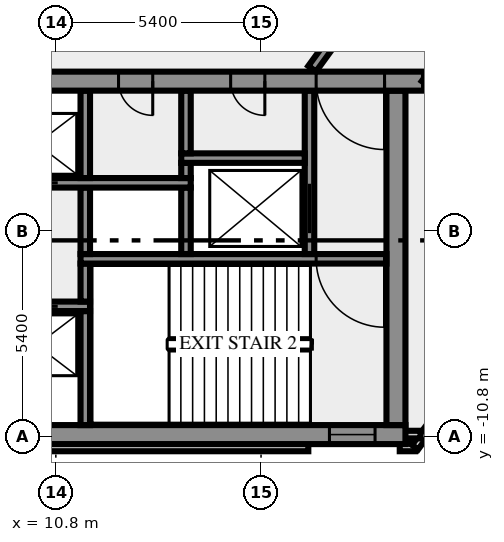
"""IFC4 building model, lengths in metres.
Left out: names, types, materials, properties, quantities, classifications, styles, units other than length and angle.
Written with IfcOpenShell. Run it as: python <this file> out.ifc"""

import sys

from ifc_helpers import new_model, si_unit, direction, frame, frame_2d, origin, place, context, subcontext, project, spatial, rectangle, extrude, element, fill, save


model = new_model("IFC4")
c1 = context("Model", 3, precision=1e-05, world=origin(), true_north=direction((0.0, 1.0)))
c2 = subcontext(c1, "Body", "Model", "MODEL_VIEW")
j1 = project(units=[si_unit("LENGTHUNIT", "METRE"), si_unit("PLANEANGLEUNIT", "RADIAN")], contexts=[c1])
p1 = place(None, origin())
s1 = spatial("IfcSite", under=j1, at=p1, CompositionType="ELEMENT")
p2 = place(p1, origin())
s2 = spatial("IfcBuilding", under=s1, at=p2, CompositionType="ELEMENT")
p3 = place(p2, frame((0.0, 0.0, 238.0)))
s3 = spatial("IfcBuildingStorey", under=s2, at=p3, CompositionType="ELEMENT", Elevation=238.0)
p4 = place(p3, frame((-17.444, -11.088, 0.0), z_axis=(0.0, 0.0, 1.0), x_axis=(1.0, 0.0, 0.0)))
e1 = element("IfcWall", 1, at=p4, inside=s3, PredefinedType="SOLIDWALL", context=c2, shape_type="SweptSolid", body=[
    extrude(rectangle(XDim=34.888, YDim=0.2, at=frame_2d((17.444, 0.0))), origin(), (0.0, 0.0, 1.0), 3.4),
])
p5 = place(p3, frame((19.85, -11.088, 0.0), z_axis=(0.0, 0.0, 1.0), x_axis=(1.0, 0.0, 0.0)))
e2 = element("IfcWall", 2, at=p5, inside=s3, PredefinedType="SOLIDWALL", context=c2, shape_type="SweptSolid", body=[
    extrude(rectangle(XDim=0.406, YDim=0.2, at=frame_2d((0.203, 0.0))), origin(), (0.0, 0.0, 1.0), 3.4),
])
p6 = place(p3, frame((20.253, -11.083, 0.0), z_axis=(0.0, 0.0, 1.0), x_axis=(0.587766567315, 0.809030569476, 0.0)))
e3 = element("IfcWall", 3, at=p6, inside=s3, PredefinedType="SOLIDWALL", context=c2, shape_type="SweptSolid", body=[
    extrude(rectangle(XDim=2.688, YDim=0.2, at=frame_2d((1.344, 0.0))), origin(), (0.0, 0.0, 1.0), 3.4),
])
p7 = place(p3, frame((19.98, -10.75, 0.0), z_axis=(0.0, 0.0, 1.0), x_axis=(1.0, 0.0, 0.0)))
e4 = element("IfcWall", 4, at=p7, inside=s3, PredefinedType="SOLIDWALL", context=c2, shape_type="SweptSolid", body=[
    extrude(rectangle(XDim=0.417, YDim=0.2, at=frame_2d((0.208, 0.0))), origin(), (0.0, 0.0, 1.0), 3.4),
])
p8 = place(p3, frame((-20.0, -10.75, 0.0), z_axis=(0.0, 0.0, 1.0), x_axis=(1.0, 0.0, 0.0)))
e5 = element("IfcWall", 5, at=p8, inside=s3, PredefinedType="SHEAR", context=c2, shape_type="SweptSolid", body=[
    extrude(rectangle(XDim=40.0, YDim=0.5, at=frame_2d((20.0, 0.0))), origin(), (0.0, 0.0, 1.0), 3.4),
])
p9 = place(p8, frame((0.8, 0.0, 1.0)))
e6 = element("IfcOpeningElement", 6, at=p9, cuts=e5, PredefinedType="OPENING", context=c2, shape_type="SweptSolid", body=[
    extrude(rectangle(XDim=1.2, YDim=1.2, at=frame_2d((0.6, 0.6))), frame((0.0, 0.26, 0.0), z_axis=(0.0, -1.0, 0.0), x_axis=(1.0, 0.0, 0.0)), (0.0, 0.0, 1.0), 0.52),
])
p10 = place(p8, frame((38.0, 0.0, 1.0)))
e7 = element("IfcOpeningElement", 7, at=p10, cuts=e5, PredefinedType="OPENING", context=c2, shape_type="SweptSolid", body=[
    extrude(rectangle(XDim=1.2, YDim=1.2, at=frame_2d((0.6, 0.6))), frame((0.0, 0.26, 0.0), z_axis=(0.0, -1.0, 0.0), x_axis=(1.0, 0.0, 0.0)), (0.0, 0.0, 1.0), 0.52),
])
p11 = place(p3, frame((11.575, -10.5, 0.0), z_axis=(0.0, 0.0, 1.0), x_axis=(0.0, 1.0, 0.0)))
e8 = element("IfcWall", 8, at=p11, inside=s3, PredefinedType="SHEAR", context=c2, shape_type="SweptSolid", body=[
    extrude(rectangle(XDim=3.0, YDim=0.25, at=frame_2d((1.5, 0.0))), origin(), (0.0, 0.0, 1.0), 3.4),
])
p12 = place(p3, frame((19.75, -10.5, 0.0), z_axis=(0.0, 0.0, 1.0), x_axis=(0.0, 1.0, 0.0)))
e9 = element("IfcWall", 9, at=p12, inside=s3, PredefinedType="SHEAR", context=c2, shape_type="SweptSolid", body=[
    extrude(rectangle(XDim=8.8, YDim=0.5, at=frame_2d((4.4, 0.0))), origin(), (0.0, 0.0, 1.0), 3.4),
])
p13 = place(p3, frame((11.7, -7.375, 0.0), z_axis=(0.0, 0.0, 1.0), x_axis=(-1.0, 0.0, 0.0)))
e10 = element("IfcWall", 10, at=p13, inside=s3, PredefinedType="SHEAR", context=c2, shape_type="SweptSolid", body=[
    extrude(rectangle(XDim=23.4, YDim=0.25, at=frame_2d((11.7, 0.0))), origin(), (0.0, 0.0, 1.0), 3.4),
])
p14 = place(p13, frame((19.05, 0.0, 0.0)))
e11 = element("IfcOpeningElement", 11, at=p14, cuts=e10, PredefinedType="OPENING", context=c2, shape_type="SweptSolid", body=[
    extrude(rectangle(XDim=0.9, YDim=2.1, at=frame_2d((0.45, 1.05))), frame((0.0, 0.135, 0.0), z_axis=(0.0, -1.0, 0.0), x_axis=(1.0, 0.0, 0.0)), (0.0, 0.0, 1.0), 0.27),
])
p15 = place(p13, frame((14.55, 0.0, 0.0)))
e12 = element("IfcOpeningElement", 12, at=p15, cuts=e10, PredefinedType="OPENING", context=c2, shape_type="SweptSolid", body=[
    extrude(rectangle(XDim=0.8, YDim=2.1, at=frame_2d((0.4, 1.05))), frame((0.0, 0.135, 0.0), z_axis=(0.0, -1.0, 0.0), x_axis=(1.0, 0.0, 0.0)), (0.0, 0.0, 1.0), 0.27),
])
p16 = place(p13, frame((12.8, 0.0, 0.0)))
e13 = element("IfcOpeningElement", 13, at=p16, cuts=e10, PredefinedType="OPENING", context=c2, shape_type="SweptSolid", body=[
    extrude(rectangle(XDim=0.9, YDim=2.1, at=frame_2d((0.45, 1.05))), frame((0.0, 0.135, 0.0), z_axis=(0.0, -1.0, 0.0), x_axis=(1.0, 0.0, 0.0)), (0.0, 0.0, 1.0), 0.27),
])
p17 = place(p13, frame((10.7, 0.0, 0.0)))
e14 = element("IfcOpeningElement", 14, at=p17, cuts=e10, PredefinedType="OPENING", context=c2, shape_type="SweptSolid", body=[
    extrude(rectangle(XDim=0.9, YDim=2.1, at=frame_2d((0.45, 1.05))), frame((0.0, 0.135, 0.0), z_axis=(0.0, -1.0, 0.0), x_axis=(1.0, 0.0, 0.0)), (0.0, 0.0, 1.0), 0.27),
])
p18 = place(p13, frame((8.35, 0.0, 0.0)))
e15 = element("IfcOpeningElement", 15, at=p18, cuts=e10, PredefinedType="OPENING", context=c2, shape_type="SweptSolid", body=[
    extrude(rectangle(XDim=1.1, YDim=2.1, at=frame_2d((0.55, 1.05))), frame((0.0, 0.135, 0.0), z_axis=(0.0, -1.0, 0.0), x_axis=(1.0, 0.0, 0.0)), (0.0, 0.0, 1.0), 0.27),
])
p19 = place(p13, frame((5.85, 0.0, 0.0)))
e16 = element("IfcOpeningElement", 16, at=p19, cuts=e10, PredefinedType="OPENING", context=c2, shape_type="SweptSolid", body=[
    extrude(rectangle(XDim=1.1, YDim=2.1, at=frame_2d((0.55, 1.05))), frame((0.0, 0.135, 0.0), z_axis=(0.0, -1.0, 0.0), x_axis=(1.0, 0.0, 0.0)), (0.0, 0.0, 1.0), 0.27),
])
p20 = place(p13, frame((3.35, 0.0, 0.0)))
e17 = element("IfcOpeningElement", 17, at=p20, cuts=e10, PredefinedType="OPENING", context=c2, shape_type="SweptSolid", body=[
    extrude(rectangle(XDim=1.1, YDim=2.1, at=frame_2d((0.55, 1.05))), frame((0.0, 0.135, 0.0), z_axis=(0.0, -1.0, 0.0), x_axis=(1.0, 0.0, 0.0)), (0.0, 0.0, 1.0), 0.27),
])
p21 = place(p13, frame((0.85, 0.0, 0.0)))
e18 = element("IfcOpeningElement", 18, at=p21, cuts=e10, PredefinedType="OPENING", context=c2, shape_type="SweptSolid", body=[
    extrude(rectangle(XDim=1.1, YDim=2.1, at=frame_2d((0.55, 1.05))), frame((0.0, 0.135, 0.0), z_axis=(0.0, -1.0, 0.0), x_axis=(1.0, 0.0, 0.0)), (0.0, 0.0, 1.0), 0.27),
])
p22 = place(p3, frame((11.575, -7.25, 0.0), z_axis=(0.0, 0.0, 1.0), x_axis=(0.0, 1.0, 0.0)))
e19 = element("IfcWall", 19, at=p22, inside=s3, PredefinedType="SHEAR", context=c2, shape_type="SweptSolid", body=[
    extrude(rectangle(XDim=1.0, YDim=0.25, at=frame_2d((0.5, 0.0))), origin(), (0.0, 0.0, 1.0), 3.4),
])
p23 = place(p3, frame((19.5, -6.125, 0.0), z_axis=(0.0, 0.0, 1.0), x_axis=(-1.0, 0.0, 0.0)))
e20 = element("IfcWall", 20, at=p23, inside=s3, PredefinedType="SHEAR", context=c2, shape_type="SweptSolid", body=[
    extrude(rectangle(XDim=8.05, YDim=0.25, at=frame_2d((4.025, 0.0))), origin(), (0.0, 0.0, 1.0), 3.4),
])
p24 = place(p23, frame((0.05, 0.0, 0.0)))
e21 = element("IfcOpeningElement", 21, at=p24, cuts=e20, PredefinedType="OPENING", context=c2, shape_type="SweptSolid", body=[
    extrude(rectangle(XDim=1.8, YDim=2.1, at=frame_2d((0.9, 1.05))), frame((0.0, 0.135, 0.0), z_axis=(0.0, -1.0, 0.0), x_axis=(1.0, 0.0, 0.0)), (0.0, 0.0, 1.0), 0.27),
])
for number, where, z_axis, x_axis in (
    (22, (11.575, -6.0, 0.0), (0.0, 0.0, 1.0), (0.0, 1.0, 0.0)),
    (23, (14.225, -6.0, 0.0), (0.0, 0.0, 1.0), (0.0, 1.0, 0.0)),
):
    element("IfcWall", number, at=place(p3, frame(where, z_axis=z_axis, x_axis=x_axis)), inside=s3, PredefinedType="SHEAR", context=c2, shape_type="SweptSolid", body=[
        extrude(rectangle(XDim=1.75, YDim=0.25, at=frame_2d((0.875, 0.0))), origin(), (0.0, 0.0, 1.0), 3.4),
    ])
p25 = place(p3, frame((17.475, -6.0, 0.0), z_axis=(0.0, 0.0, 1.0), x_axis=(0.0, 1.0, 0.0)))
e24 = element("IfcWall", 24, at=p25, inside=s3, PredefinedType="SHEAR", context=c2, shape_type="SweptSolid", body=[
    extrude(rectangle(XDim=4.3, YDim=0.25, at=frame_2d((2.15, 0.0))), origin(), (0.0, 0.0, 1.0), 3.4),
])
p26 = place(p25, frame((0.55, 0.0, 0.0)))
e25 = element("IfcOpeningElement", 25, at=p26, cuts=e24, PredefinedType="OPENING", context=c2, shape_type="SweptSolid", body=[
    extrude(rectangle(XDim=1.3, YDim=2.1, at=frame_2d((0.65, 1.05))), frame((0.0, 0.135, 0.0), z_axis=(0.0, -1.0, 0.0), x_axis=(1.0, 0.0, 0.0)), (0.0, 0.0, 1.0), 0.27),
])
p27 = place(p3, frame((1.45, -4.125, 0.0), z_axis=(0.0, 0.0, 1.0), x_axis=(1.0, 0.0, 0.0)))
e26 = element("IfcWall", 26, at=p27, inside=s3, PredefinedType="SHEAR", context=c2, shape_type="SweptSolid", body=[
    extrude(rectangle(XDim=12.9, YDim=0.25, at=frame_2d((6.45, 0.0))), origin(), (0.0, 0.0, 1.0), 3.4),
])
p28 = place(p27, frame((0.7, 0.0, 0.0)))
e27 = element("IfcOpeningElement", 27, at=p28, cuts=e26, PredefinedType="OPENING", context=c2, shape_type="SweptSolid", body=[
    extrude(rectangle(XDim=1.3, YDim=2.1, at=frame_2d((0.65, 1.05))), frame((0.0, 0.135, 0.0), z_axis=(0.0, -1.0, 0.0), x_axis=(1.0, 0.0, 0.0)), (0.0, 0.0, 1.0), 0.27),
])
p29 = place(p27, frame((3.3, 0.0, 0.0)))
e28 = element("IfcOpeningElement", 28, at=p29, cuts=e26, PredefinedType="OPENING", context=c2, shape_type="SweptSolid", body=[
    extrude(rectangle(XDim=1.1, YDim=2.1, at=frame_2d((0.55, 1.05))), frame((0.0, 0.135, 0.0), z_axis=(0.0, -1.0, 0.0), x_axis=(1.0, 0.0, 0.0)), (0.0, 0.0, 1.0), 0.27),
])
p30 = place(p27, frame((5.8, 0.0, 0.0)))
e29 = element("IfcOpeningElement", 29, at=p30, cuts=e26, PredefinedType="OPENING", context=c2, shape_type="SweptSolid", body=[
    extrude(rectangle(XDim=1.1, YDim=2.1, at=frame_2d((0.55, 1.05))), frame((0.0, 0.135, 0.0), z_axis=(0.0, -1.0, 0.0), x_axis=(1.0, 0.0, 0.0)), (0.0, 0.0, 1.0), 0.27),
])
p31 = place(p27, frame((8.3, 0.0, 0.0)))
e30 = element("IfcOpeningElement", 30, at=p31, cuts=e26, PredefinedType="OPENING", context=c2, shape_type="SweptSolid", body=[
    extrude(rectangle(XDim=1.1, YDim=2.1, at=frame_2d((0.55, 1.05))), frame((0.0, 0.135, 0.0), z_axis=(0.0, -1.0, 0.0), x_axis=(1.0, 0.0, 0.0)), (0.0, 0.0, 1.0), 0.27),
])
p32 = place(p3, frame((11.575, -4.0, 0.0), z_axis=(0.0, 0.0, 1.0), x_axis=(0.0, 1.0, 0.0)))
e31 = element("IfcWall", 31, at=p32, inside=s3, PredefinedType="SHEAR", context=c2, shape_type="SweptSolid", body=[
    extrude(rectangle(XDim=2.3, YDim=0.25, at=frame_2d((1.15, 0.0))), origin(), (0.0, 0.0, 1.0), 3.4),
])
p33 = place(p3, frame((14.225, -4.0, 0.0), z_axis=(0.0, 0.0, 1.0), x_axis=(0.0, 1.0, 0.0)))
e32 = element("IfcWall", 32, at=p33, inside=s3, PredefinedType="SHEAR", context=c2, shape_type="SweptSolid", body=[
    extrude(rectangle(XDim=0.4, YDim=0.25, at=frame_2d((0.2, 0.0))), origin(), (0.0, 0.0, 1.0), 3.4),
])
p34 = place(p3, frame((14.1, -3.475, 0.0), z_axis=(0.0, 0.0, 1.0), x_axis=(1.0, 0.0, 0.0)))
e33 = element("IfcWall", 33, at=p34, inside=s3, PredefinedType="SHEAR", context=c2, shape_type="SweptSolid", body=[
    extrude(rectangle(XDim=3.25, YDim=0.25, at=frame_2d((1.625, 0.0))), origin(), (0.0, 0.0, 1.0), 3.4),
])
p35 = place(p3, frame((14.225, -3.35, 0.0), z_axis=(0.0, 0.0, 1.0), x_axis=(0.0, 1.0, 0.0)))
e34 = element("IfcWall", 34, at=p35, inside=s3, PredefinedType="SHEAR", context=c2, shape_type="SweptSolid", body=[
    extrude(rectangle(XDim=1.65, YDim=0.25, at=frame_2d((0.825, 0.0))), origin(), (0.0, 0.0, 1.0), 3.4),
])
p36 = place(p3, frame((20.49, -1.45, 0.0), z_axis=(0.0, 0.0, 1.0), x_axis=(-1.0, 0.0, 0.0)))
e35 = element("IfcWall", 35, at=p36, inside=s3, PredefinedType="SHEAR", context=c2, shape_type="SweptSolid", body=[
    extrude(rectangle(XDim=40.98, YDim=0.5, at=frame_2d((20.49, 0.0))), origin(), (0.0, 0.0, 1.0), 3.4),
])
p37 = place(p36, frame((38.14, 0.0, 0.0)))
e36 = element("IfcOpeningElement", 36, at=p37, cuts=e35, PredefinedType="OPENING", context=c2, shape_type="SweptSolid", body=[
    extrude(rectangle(XDim=1.8, YDim=2.1, at=frame_2d((0.9, 1.05))), frame((0.0, 0.26, 0.0), z_axis=(0.0, -1.0, 0.0), x_axis=(1.0, 0.0, 0.0)), (0.0, 0.0, 1.0), 0.52),
])
p38 = place(p36, frame((36.728, 0.0, 0.0)))
e37 = element("IfcOpeningElement", 37, at=p38, cuts=e35, PredefinedType="OPENING", context=c2, shape_type="SweptSolid", body=[
    extrude(rectangle(XDim=0.8, YDim=2.1, at=frame_2d((0.4, 1.05))), frame((0.0, 0.26, 0.0), z_axis=(0.0, -1.0, 0.0), x_axis=(1.0, 0.0, 0.0)), (0.0, 0.0, 1.0), 0.52),
])
p39 = place(p36, frame((35.153, 0.0, 0.0)))
e38 = element("IfcOpeningElement", 38, at=p39, cuts=e35, PredefinedType="OPENING", context=c2, shape_type="SweptSolid", body=[
    extrude(rectangle(XDim=0.8, YDim=2.1, at=frame_2d((0.4, 1.05))), frame((0.0, 0.26, 0.0), z_axis=(0.0, -1.0, 0.0), x_axis=(1.0, 0.0, 0.0)), (0.0, 0.0, 1.0), 0.52),
])
p40 = place(p36, frame((32.94, 0.0, 0.0)))
e39 = element("IfcOpeningElement", 39, at=p40, cuts=e35, PredefinedType="OPENING", context=c2, shape_type="SweptSolid", body=[
    extrude(rectangle(XDim=0.9, YDim=2.1, at=frame_2d((0.45, 1.05))), frame((0.0, 0.26, 0.0), z_axis=(0.0, -1.0, 0.0), x_axis=(1.0, 0.0, 0.0)), (0.0, 0.0, 1.0), 0.52),
])
p41 = place(p36, frame((29.603, 0.0, 0.0)))
e40 = element("IfcOpeningElement", 40, at=p41, cuts=e35, PredefinedType="OPENING", context=c2, shape_type="SweptSolid", body=[
    extrude(rectangle(XDim=0.9, YDim=2.1, at=frame_2d((0.45, 1.05))), frame((0.0, 0.26, 0.0), z_axis=(0.0, -1.0, 0.0), x_axis=(1.0, 0.0, 0.0)), (0.0, 0.0, 1.0), 0.52),
])
p42 = place(p36, frame((25.877, 0.0, 0.0)))
e41 = element("IfcOpeningElement", 41, at=p42, cuts=e35, PredefinedType="OPENING", context=c2, shape_type="SweptSolid", body=[
    extrude(rectangle(XDim=0.9, YDim=2.1, at=frame_2d((0.45, 1.05))), frame((0.0, 0.26, 0.0), z_axis=(0.0, -1.0, 0.0), x_axis=(1.0, 0.0, 0.0)), (0.0, 0.0, 1.0), 0.52),
])
p43 = place(p36, frame((19.59, 0.0, 0.0)))
e42 = element("IfcOpeningElement", 42, at=p43, cuts=e35, PredefinedType="OPENING", context=c2, shape_type="SweptSolid", body=[
    extrude(rectangle(XDim=2.0, YDim=2.1, at=frame_2d((1.0, 1.05))), frame((0.0, 0.26, 0.0), z_axis=(0.0, -1.0, 0.0), x_axis=(1.0, 0.0, 0.0)), (0.0, 0.0, 1.0), 0.52),
])
p44 = place(p36, frame((7.14, 0.0, 0.0)))
e43 = element("IfcOpeningElement", 43, at=p44, cuts=e35, PredefinedType="OPENING", context=c2, shape_type="SweptSolid", body=[
    extrude(rectangle(XDim=0.9, YDim=2.1, at=frame_2d((0.45, 1.05))), frame((0.0, 0.26, 0.0), z_axis=(0.0, -1.0, 0.0), x_axis=(1.0, 0.0, 0.0)), (0.0, 0.0, 1.0), 0.52),
])
p45 = place(p36, frame((4.19, 0.0, 0.0)))
e44 = element("IfcOpeningElement", 44, at=p45, cuts=e35, PredefinedType="OPENING", context=c2, shape_type="SweptSolid", body=[
    extrude(rectangle(XDim=0.9, YDim=2.1, at=frame_2d((0.45, 1.05))), frame((0.0, 0.26, 0.0), z_axis=(0.0, -1.0, 0.0), x_axis=(1.0, 0.0, 0.0)), (0.0, 0.0, 1.0), 0.52),
])
p46 = place(p36, frame((1.04, 0.0, 0.0)))
e45 = element("IfcOpeningElement", 45, at=p46, cuts=e35, PredefinedType="OPENING", context=c2, shape_type="SweptSolid", body=[
    extrude(rectangle(XDim=1.8, YDim=2.1, at=frame_2d((0.9, 1.05))), frame((0.0, 0.26, 0.0), z_axis=(0.0, -1.0, 0.0), x_axis=(1.0, 0.0, 0.0)), (0.0, 0.0, 1.0), 0.52),
])
p47 = place(p3, frame((17.545, -1.125, 0.0), z_axis=(0.0, 0.0, 1.0), x_axis=(0.587796810203, 0.809008596935, 0.0)))
e46 = element("IfcWall", 46, at=p47, inside=s3, PredefinedType="SOLIDWALL", context=c2, shape_type="SweptSolid", body=[
    extrude(rectangle(XDim=12.703, YDim=0.25, at=frame_2d((6.352, 0.0))), origin(), (0.0, 0.0, 1.0), 3.4),
])
p48 = place(p47, frame((11.329, 0.0, 0.0)))
e47 = element("IfcOpeningElement", 47, at=p48, cuts=e46, PredefinedType="OPENING", context=c2, shape_type="SweptSolid", body=[
    extrude(rectangle(XDim=0.9, YDim=2.1, at=frame_2d((0.45, 1.05))), frame((0.0, 0.135, 0.0), z_axis=(0.0, -1.0, 0.0), x_axis=(1.0, 0.0, 0.0)), (0.0, 0.0, 1.0), 0.27),
])
p49 = place(p3, frame((27.009, 7.392, 0.0), z_axis=(0.0, 0.0, 1.0), x_axis=(-0.587776457057, -0.809023384414, 0.0)))
e48 = element("IfcWall", 48, at=p49, inside=s3, PredefinedType="SOLIDWALL", context=c2, shape_type="SweptSolid", body=[
    extrude(rectangle(XDim=11.021, YDim=0.25, at=frame_2d((5.51, 0.0))), origin(), (0.0, 0.0, 1.0), 3.4),
])
p50 = place(p49, frame((3.905, 0.0, 0.0)))
e49 = element("IfcOpeningElement", 49, at=p50, cuts=e48, PredefinedType="OPENING", context=c2, shape_type="SweptSolid", body=[
    extrude(rectangle(XDim=0.9, YDim=2.1, at=frame_2d((0.45, 1.05))), frame((0.0, 0.135, 0.0), z_axis=(0.0, -1.0, 0.0), x_axis=(1.0, 0.0, 0.0)), (0.0, 0.0, 1.0), 0.27),
])
p51 = place(p49, frame((0.225, 0.0, 0.0)))
e50 = element("IfcOpeningElement", 50, at=p51, cuts=e48, PredefinedType="OPENING", context=c2, shape_type="SweptSolid", body=[
    extrude(rectangle(XDim=0.9, YDim=2.1, at=frame_2d((0.45, 1.05))), frame((0.0, 0.135, 0.0), z_axis=(0.0, -1.0, 0.0), x_axis=(1.0, 0.0, 0.0)), (0.0, 0.0, 1.0), 0.27),
])
p52 = place(p10, origin())
e51 = element("IfcWindow", 51, at=p52, inside=s3, PartitioningType="SINGLE_PANEL", PredefinedType="WINDOW", context=c2, shape_type="SweptSolid", body=[
    extrude(rectangle(XDim=1.2, YDim=1.2, at=frame_2d((0.6, 0.6))), frame((0.0, 0.03, 0.0), z_axis=(0.0, -1.0, 0.0), x_axis=(1.0, 0.0, 0.0)), (0.0, 0.0, 1.0), 0.06),
])
fill(e7, e51)
p53 = place(p21, origin())
e52 = element("IfcDoor", 52, at=p53, inside=s3, OperationType="DOUBLE_DOOR_SLIDING", PredefinedType="DOOR", context=c2, shape_type="SweptSolid", body=[
    extrude(rectangle(XDim=1.1, YDim=2.1, at=frame_2d((0.55, 1.05))), frame((0.0, 0.025, 0.0), z_axis=(0.0, -1.0, 0.0), x_axis=(1.0, 0.0, 0.0)), (0.0, 0.0, 1.0), 0.05),
])
fill(e18, e52)
p54 = place(p24, origin())
e53 = element("IfcDoor", 53, at=p54, inside=s3, OperationType="DOUBLE_DOOR_SINGLE_SWING", PredefinedType="DOOR", context=c2, shape_type="SweptSolid", body=[
    extrude(rectangle(XDim=1.8, YDim=2.1, at=frame_2d((0.9, 1.05))), frame((0.0, 0.025, 0.0), z_axis=(0.0, -1.0, 0.0), x_axis=(1.0, 0.0, 0.0)), (0.0, 0.0, 1.0), 0.05),
])
fill(e21, e53)
p55 = place(p26, origin())
e54 = element("IfcDoor", 54, at=p55, inside=s3, OperationType="DOUBLE_DOOR_SLIDING", PredefinedType="DOOR", context=c2, shape_type="SweptSolid", body=[
    extrude(rectangle(XDim=1.3, YDim=2.1, at=frame_2d((0.65, 1.05))), frame((0.0, 0.025, 0.0), z_axis=(0.0, -1.0, 0.0), x_axis=(1.0, 0.0, 0.0)), (0.0, 0.0, 1.0), 0.05),
])
fill(e25, e54)
p56 = place(p31, origin())
e55 = element("IfcDoor", 55, at=p56, inside=s3, OperationType="DOUBLE_DOOR_SLIDING", PredefinedType="DOOR", context=c2, shape_type="SweptSolid", body=[
    extrude(rectangle(XDim=1.1, YDim=2.1, at=frame_2d((0.55, 1.05))), frame((0.0, 0.025, 0.0), z_axis=(0.0, -1.0, 0.0), x_axis=(1.0, 0.0, 0.0)), (0.0, 0.0, 1.0), 0.05),
])
fill(e30, e55)
p57 = place(p44, origin())
e56 = element("IfcDoor", 56, at=p57, inside=s3, OperationType="SINGLE_SWING_LEFT", PredefinedType="DOOR", context=c2, shape_type="SweptSolid", body=[
    extrude(rectangle(XDim=0.9, YDim=2.1, at=frame_2d((0.45, 1.05))), frame((0.0, 0.025, 0.0), z_axis=(0.0, -1.0, 0.0), x_axis=(1.0, 0.0, 0.0)), (0.0, 0.0, 1.0), 0.05),
])
fill(e43, e56)
p58 = place(p45, origin())
e57 = element("IfcDoor", 57, at=p58, inside=s3, OperationType="SINGLE_SWING_LEFT", PredefinedType="DOOR", context=c2, shape_type="SweptSolid", body=[
    extrude(rectangle(XDim=0.9, YDim=2.1, at=frame_2d((0.45, 1.05))), frame((0.0, 0.025, 0.0), z_axis=(0.0, -1.0, 0.0), x_axis=(1.0, 0.0, 0.0)), (0.0, 0.0, 1.0), 0.05),
])
fill(e44, e57)
p59 = place(p46, origin())
e58 = element("IfcDoor", 58, at=p59, inside=s3, OperationType="DOUBLE_DOOR_SINGLE_SWING", PredefinedType="DOOR", context=c2, shape_type="SweptSolid", body=[
    extrude(rectangle(XDim=1.8, YDim=2.1, at=frame_2d((0.9, 1.05))), frame((0.0, 0.025, 0.0), z_axis=(0.0, -1.0, 0.0), x_axis=(1.0, 0.0, 0.0)), (0.0, 0.0, 1.0), 0.05),
])
fill(e45, e58)
save(model, sys.argv[1])
